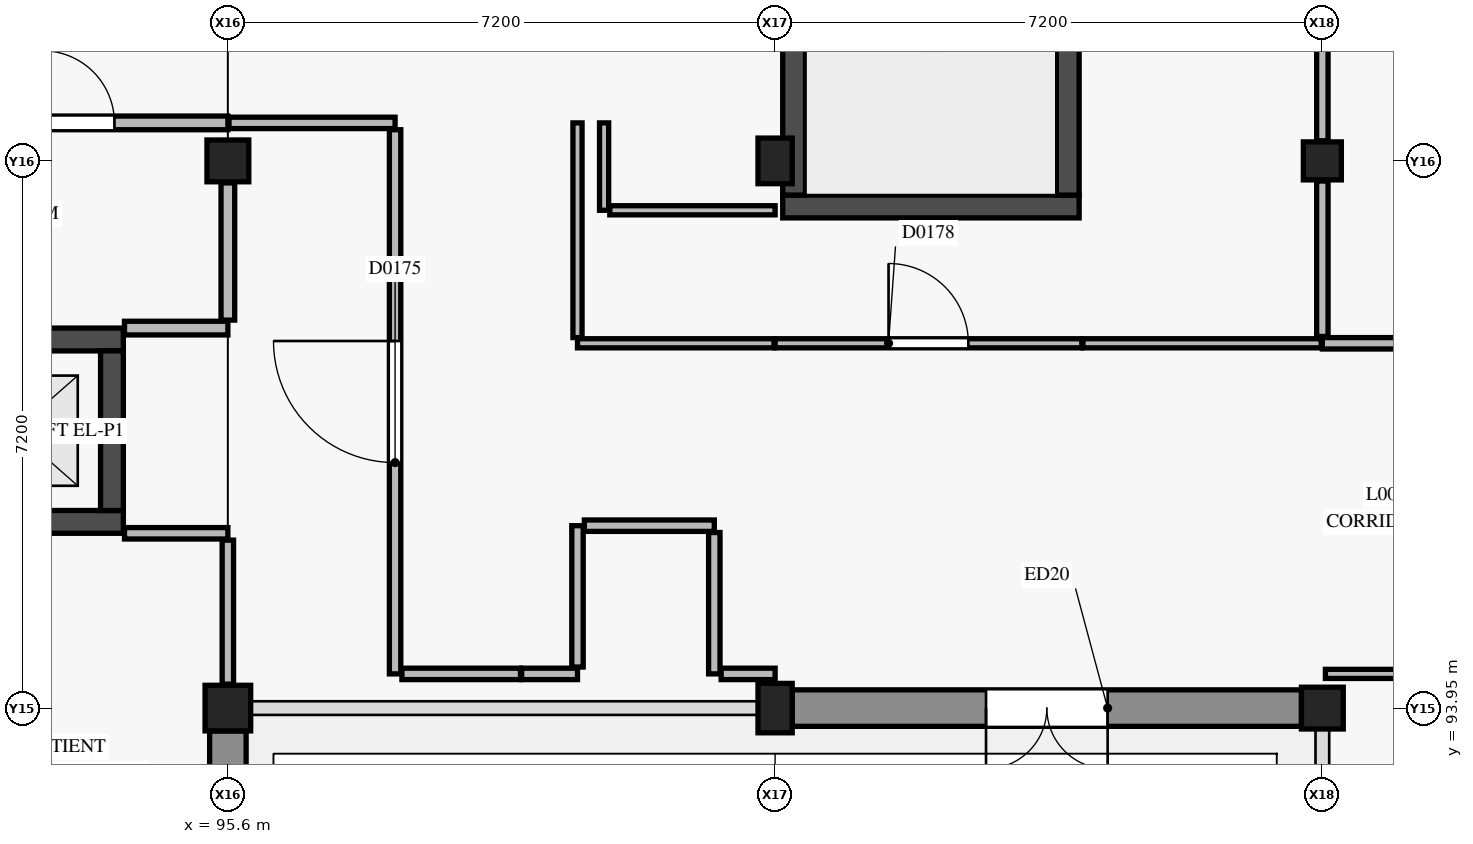
"""IFC4 building model, lengths in metres.
Left out: names, types, materials, properties, quantities, classifications, styles, units other than length and angle.
Written with IfcOpenShell. Run it as: python <this file> out.ifc"""

import sys

from ifc_helpers import new_model, si_unit, direction, frame, frame_2d, origin, origin_2d, place, context, subcontext, project, spatial, rectangle, extrude, element, fill, save


model = new_model("IFC4")
c1 = context("Model", 3, precision=1e-05, world=origin(), true_north=direction((0.0, 1.0)))
c2 = subcontext(c1, "Body", "Model", "MODEL_VIEW")
j1 = project(units=[si_unit("LENGTHUNIT", "METRE"), si_unit("PLANEANGLEUNIT", "RADIAN")], contexts=[c1])
p1 = place(None, origin())
s1 = spatial("IfcSite", under=j1, at=p1, CompositionType="ELEMENT")
p2 = place(p1, origin())
s2 = spatial("IfcBuilding", under=s1, at=p2, CompositionType="ELEMENT")
p3 = place(p2, origin())
s3 = spatial("IfcBuildingStorey", under=s2, at=p3, CompositionType="ELEMENT", Elevation=0.0)
p4 = place(p3, frame((95.6, 93.95, 0.0), z_axis=(0.0, 0.0, 1.0), x_axis=(1.0, 0.0, 0.0)))
e1 = element("IfcColumn", 1, at=p4, inside=s3, PredefinedType="COLUMN", context=c2, shape_type="SweptSolid", body=[
    extrude(rectangle(XDim=0.6, YDim=0.6, at=origin_2d()), origin(), (0.0, 0.0, 1.0), 4.8),
])
p5 = place(p3, frame((95.6, 101.15, 0.0), z_axis=(0.0, 0.0, 1.0), x_axis=(1.0, 0.0, 0.0)))
e2 = element("IfcColumn", 2, at=p5, inside=s3, PredefinedType="COLUMN", context=c2, shape_type="SweptSolid", body=[
    extrude(rectangle(XDim=0.55, YDim=0.55, at=origin_2d()), origin(), (0.0, 0.0, 1.0), 4.8),
])
p6 = place(p3, frame((102.8, 93.95, 0.0), z_axis=(0.0, 0.0, 1.0), x_axis=(1.0, 0.0, 0.0)))
e3 = element("IfcColumn", 3, at=p6, inside=s3, PredefinedType="COLUMN", context=c2, shape_type="SweptSolid", body=[
    extrude(rectangle(XDim=0.45, YDim=0.65, at=origin_2d()), origin(), (0.0, 0.0, 1.0), 4.8),
])
p7 = place(p3, frame((102.8, 101.15, 0.0), z_axis=(0.0, 0.0, 1.0), x_axis=(1.0, 0.0, 0.0)))
e4 = element("IfcColumn", 4, at=p7, inside=s3, PredefinedType="COLUMN", context=c2, shape_type="SweptSolid", body=[
    extrude(rectangle(XDim=0.45, YDim=0.6, at=origin_2d()), origin(), (0.0, 0.0, 1.0), 4.8),
])
p8 = place(p3, frame((110.0, 93.95, 0.0), z_axis=(0.0, 0.0, 1.0), x_axis=(1.0, 0.0, 0.0)))
e5 = element("IfcColumn", 5, at=p8, inside=s3, PredefinedType="COLUMN", context=c2, shape_type="SweptSolid", body=[
    extrude(rectangle(XDim=0.55, YDim=0.55, at=origin_2d()), origin(), (0.0, 0.0, 1.0), 4.8),
])
p9 = place(p3, frame((110.0, 101.15, 0.0), z_axis=(0.0, 0.0, 1.0), x_axis=(1.0, 0.0, 0.0)))
e6 = element("IfcColumn", 6, at=p9, inside=s3, PredefinedType="COLUMN", context=c2, shape_type="SweptSolid", body=[
    extrude(rectangle(XDim=0.5, YDim=0.5, at=origin_2d()), origin(), (0.0, 0.0, 1.0), 4.8),
])
p10 = place(p3, frame((102.9, 100.55, 0.0), z_axis=(0.0, 0.0, 1.0), x_axis=(1.0, 0.0, 0.0)))
e7 = element("IfcWall", 7, at=p10, inside=s3, PredefinedType="SHEAR", context=c2, shape_type="SweptSolid", body=[
    extrude(rectangle(XDim=3.9, YDim=0.3, at=frame_2d((1.95, 0.0))), origin(), (0.0, 0.0, 1.0), 4.55),
])
p11 = place(p3, frame((103.05, 100.7, 0.0), z_axis=(0.0, 0.0, 1.0), x_axis=(0.0, 1.0, 0.0)))
e8 = element("IfcWall", 8, at=p11, inside=s3, PredefinedType="SHEAR", context=c2, shape_type="SweptSolid", body=[
    extrude(rectangle(XDim=7.3, YDim=0.3, at=frame_2d((3.65, 0.0))), origin(), (0.0, 0.0, 1.0), 4.55),
])
p12 = place(p11, frame((5.68, 0.0, 0.0)))
e9 = element("IfcOpeningElement", 9, at=p12, cuts=e8, PredefinedType="OPENING", context=c2, shape_type="SweptSolid", body=[
    extrude(rectangle(XDim=1.5, YDim=2.15, at=frame_2d((0.75, 1.075))), frame((0.0, 0.16, 0.0), z_axis=(0.0, -1.0, 0.0), x_axis=(1.0, 0.0, 0.0)), (0.0, 0.0, 1.0), 0.32),
])
p13 = place(p3, frame((106.65, 100.7, 0.0), z_axis=(0.0, 0.0, 1.0), x_axis=(0.0, 1.0, 0.0)))
e10 = element("IfcWall", 10, at=p13, inside=s3, PredefinedType="SHEAR", context=c2, shape_type="SweptSolid", body=[
    extrude(rectangle(XDim=7.3, YDim=0.3, at=frame_2d((3.65, 0.0))), origin(), (0.0, 0.0, 1.0), 4.55),
])
for number, where, z_axis, x_axis in (
    (11, (91.375, 96.4, 0.0), (0.0, 0.0, 1.0), (1.0, 0.0, 0.0)),
    (12, (91.375, 98.8, 0.0), (0.0, 0.0, 1.0), (1.0, 0.0, 0.0)),
):
    element("IfcWall", number, at=place(p3, frame(where, z_axis=z_axis, x_axis=x_axis)), inside=s3, PredefinedType="SHEAR", context=c2, shape_type="SweptSolid", body=[
        extrude(rectangle(XDim=2.85, YDim=0.3, at=frame_2d((1.425, 0.0))), origin(), (0.0, 0.0, 1.0), 4.55),
    ])
p14 = place(p3, frame((94.075, 96.55, 0.0), z_axis=(0.0, 0.0, 1.0), x_axis=(0.0, 1.0, 0.0)))
e13 = element("IfcWall", 13, at=p14, inside=s3, PredefinedType="SHEAR", context=c2, shape_type="SweptSolid", body=[
    extrude(rectangle(XDim=2.1, YDim=0.3, at=frame_2d((1.05, 0.0))), origin(), (0.0, 0.0, 1.0), 4.55),
])
p15 = place(p3, frame((109.725, 93.95, 0.0), z_axis=(0.0, 0.0, 1.0), x_axis=(-1.0, 0.0, 0.0)))
e14 = element("IfcWall", 14, at=p15, inside=s3, PredefinedType="SOLIDWALL", context=c2, shape_type="SweptSolid", body=[
    extrude(rectangle(XDim=6.7, YDim=0.48, at=frame_2d((3.35, 0.0))), origin(), (0.0, 0.0, 1.0), 3.73),
])
p16 = place(p15, frame((2.55, 0.0, 0.0)))
e15 = element("IfcOpeningElement", 15, at=p16, cuts=e14, PredefinedType="OPENING", context=c2, shape_type="SweptSolid", body=[
    extrude(rectangle(XDim=1.6, YDim=2.3, at=frame_2d((0.8, 1.15))), frame((0.0, 0.25, 0.0), z_axis=(0.0, -1.0, 0.0), x_axis=(1.0, 0.0, 0.0)), (0.0, 0.0, 1.0), 0.5),
])
p17 = place(p3, frame((95.6, 93.65, 0.0), z_axis=(0.0, 0.0, 1.0), x_axis=(0.0, -1.0, 0.0)))
e16 = element("IfcWall", 16, at=p17, inside=s3, PredefinedType="SOLIDWALL", context=c2, shape_type="SweptSolid", body=[
    extrude(rectangle(XDim=6.575, YDim=0.48, at=frame_2d((3.288, 0.0))), origin(), (0.0, 0.0, 1.0), 3.73),
])
p18 = place(p17, frame((0.64, 0.0, 0.9)))
e17 = element("IfcOpeningElement", 17, at=p18, cuts=e16, PredefinedType="OPENING", context=c2, shape_type="SweptSolid", body=[
    extrude(rectangle(XDim=1.8, YDim=0.9, at=frame_2d((0.9, 0.45))), frame((0.0, 0.25, 0.0), z_axis=(0.0, -1.0, 0.0), x_axis=(1.0, 0.0, 0.0)), (0.0, 0.0, 1.0), 0.5),
])
p19 = place(p17, frame((4.448, 0.0, 0.6)))
e18 = element("IfcOpeningElement", 18, at=p19, cuts=e16, PredefinedType="OPENING", context=c2, shape_type="SweptSolid", body=[
    extrude(rectangle(XDim=0.8, YDim=2.6, at=frame_2d((0.4, 1.3))), frame((0.0, 0.25, 0.0), z_axis=(0.0, -1.0, 0.0), x_axis=(1.0, 0.0, 0.0)), (0.0, 0.0, 1.0), 0.5),
])
p20 = place(p3, frame((91.665, 101.65, 0.0), z_axis=(0.0, 0.0, 1.0), x_axis=(1.0, 0.0, 0.0)))
e19 = element("IfcWall", 19, at=p20, inside=s3, PredefinedType="PLUMBINGWALL", context=c2, shape_type="SweptSolid", body=[
    extrude(rectangle(XDim=3.935, YDim=0.18, at=frame_2d((1.968, 0.0))), origin(), (0.0, 0.0, 1.0), 3.885),
])
p21 = place(p20, frame((1.492, 0.0, 0.0)))
e20 = element("IfcOpeningElement", 20, at=p21, cuts=e19, PredefinedType="OPENING", context=c2, shape_type="SweptSolid", body=[
    extrude(rectangle(XDim=0.95, YDim=2.1, at=frame_2d((0.475, 1.05))), frame((0.0, 0.1, 0.0), z_axis=(0.0, -1.0, 0.0), x_axis=(1.0, 0.0, 0.0)), (0.0, 0.0, 1.0), 0.2),
])
p22 = place(p3, frame((95.615, 101.65, 0.0), z_axis=(0.0, 0.0, 1.0), x_axis=(1.0, 0.0, 0.0)))
e21 = element("IfcWall", 21, at=p22, inside=s3, PredefinedType="PARTITIONING", context=c2, shape_type="SweptSolid", body=[
    extrude(rectangle(XDim=2.185, YDim=0.15, at=frame_2d((1.093, 0.0))), origin(), (0.0, 0.0, 1.0), 3.885),
])
p23 = place(p3, frame((97.8, 94.4, 0.0), z_axis=(0.0, 0.0, 1.0), x_axis=(0.0, 1.0, 0.0)))
e22 = element("IfcWall", 22, at=p23, inside=s3, PredefinedType="PARTITIONING", context=c2, shape_type="SweptSolid", body=[
    extrude(rectangle(XDim=7.16, YDim=0.15, at=frame_2d((3.58, 0.0))), origin(), (0.0, 0.0, 1.0), 3.955),
])
p24 = place(p23, frame((2.78, 0.0, 0.0)))
e23 = element("IfcOpeningElement", 23, at=p24, cuts=e22, PredefinedType="OPENING", context=c2, shape_type="SweptSolid", body=[
    extrude(rectangle(XDim=1.6, YDim=2.25, at=frame_2d((0.8, 1.125))), frame((0.0, 0.085, 0.0), z_axis=(0.0, -1.0, 0.0), x_axis=(1.0, 0.0, 0.0)), (0.0, 0.0, 1.0), 0.17),
])
p25 = place(p3, frame((97.89, 94.4, 0.0), z_axis=(0.0, 0.0, 1.0), x_axis=(1.0, 0.0, 0.0)))
e24 = element("IfcWall", 24, at=p25, inside=s3, PredefinedType="PARTITIONING", context=c2, shape_type="SweptSolid", body=[
    extrude(rectangle(XDim=1.56, YDim=0.15, at=frame_2d((0.78, 0.0))), origin(), (0.0, 0.0, 1.0), 4.55),
])
p26 = place(p3, frame((99.465, 94.4, 0.0), z_axis=(0.0, 0.0, 1.0), x_axis=(1.0, 0.0, 0.0)))
e25 = element("IfcWall", 25, at=p26, inside=s3, PredefinedType="PARTITIONING", context=c2, shape_type="SweptSolid", body=[
    extrude(rectangle(XDim=0.735, YDim=0.15, at=frame_2d((0.367, 0.0))), origin(), (0.0, 0.0, 1.0), 4.55),
])
p27 = place(p3, frame((100.2, 94.49, 0.0), z_axis=(0.0, 0.0, 1.0), x_axis=(0.0, 1.0, 0.0)))
e26 = element("IfcWall", 26, at=p27, inside=s3, PredefinedType="PARTITIONING", context=c2, shape_type="SweptSolid", body=[
    extrude(rectangle(XDim=1.86, YDim=0.15, at=frame_2d((0.93, 0.0))), origin(), (0.0, 0.0, 1.0), 4.075),
])
p28 = place(p3, frame((100.29, 96.35, 0.0), z_axis=(0.0, 0.0, 1.0), x_axis=(1.0, 0.0, 0.0)))
e27 = element("IfcWall", 27, at=p28, inside=s3, PredefinedType="PARTITIONING", context=c2, shape_type="SweptSolid", body=[
    extrude(rectangle(XDim=1.71, YDim=0.15, at=frame_2d((0.855, 0.0))), origin(), (0.0, 0.0, 1.0), 4.075),
])
p29 = place(p3, frame((102.0, 94.4, 0.0), z_axis=(0.0, 0.0, 1.0), x_axis=(0.0, 1.0, 0.0)))
e28 = element("IfcWall", 28, at=p29, inside=s3, PredefinedType="PARTITIONING", context=c2, shape_type="SweptSolid", body=[
    extrude(rectangle(XDim=1.86, YDim=0.15, at=frame_2d((0.93, 0.0))), origin(), (0.0, 0.0, 1.0), 4.55),
])
p30 = place(p3, frame((102.09, 94.4, 0.0), z_axis=(0.0, 0.0, 1.0), x_axis=(1.0, 0.0, 0.0)))
e29 = element("IfcWall", 29, at=p30, inside=s3, PredefinedType="PARTITIONING", context=c2, shape_type="SweptSolid", body=[
    extrude(rectangle(XDim=0.71, YDim=0.15, at=frame_2d((0.355, 0.0))), origin(), (0.0, 0.0, 1.0), 4.015),
])
p31 = place(p3, frame((110.0, 98.75, 0.0), z_axis=(0.0, 0.0, 1.0), x_axis=(1.0, 0.0, 0.0)))
e30 = element("IfcWall", 30, at=p31, inside=s3, PredefinedType="PARTITIONING", context=c2, shape_type="SweptSolid", body=[
    extrude(rectangle(XDim=2.31, YDim=0.15, at=frame_2d((1.155, 0.0))), origin(), (0.0, 0.0, 1.0), 3.885),
])
p32 = place(p3, frame((110.04, 94.4, 0.0), z_axis=(0.0, 0.0, 1.0), x_axis=(1.0, 0.0, 0.0)))
e31 = element("IfcWall", 31, at=p32, inside=s3, PredefinedType="PARTITIONING", context=c2, shape_type="SweptSolid", body=[
    extrude(rectangle(XDim=2.285, YDim=0.12, at=frame_2d((1.143, 0.0))), origin(), (0.0, 0.0, 1.0), 3.885),
])
p33 = place(p3, frame((100.55, 100.5, 0.0), z_axis=(0.0, 0.0, 1.0), x_axis=(0.0, 1.0, 0.0)))
e32 = element("IfcWall", 32, at=p33, inside=s3, PredefinedType="PARTITIONING", context=c2, shape_type="SweptSolid", body=[
    extrude(rectangle(XDim=1.15, YDim=0.12, at=frame_2d((0.575, 0.0))), origin(), (0.0, 0.0, 1.0), 3.955),
])
p34 = place(p3, frame((100.625, 100.5, 0.0), z_axis=(0.0, 0.0, 1.0), x_axis=(1.0, 0.0, 0.0)))
e33 = element("IfcWall", 33, at=p34, inside=s3, PredefinedType="PARTITIONING", context=c2, shape_type="SweptSolid", body=[
    extrude(rectangle(XDim=2.175, YDim=0.12, at=frame_2d((1.087, 0.0))), origin(), (0.0, 0.0, 1.0), 4.015),
])
p35 = place(p3, frame((106.85, 98.75, 0.0), z_axis=(0.0, 0.0, 1.0), x_axis=(1.0, 0.0, 0.0)))
e34 = element("IfcWall", 34, at=p35, inside=s3, PredefinedType="PARTITIONING", context=c2, shape_type="SweptSolid", body=[
    extrude(rectangle(XDim=3.135, YDim=0.12, at=frame_2d((1.567, 0.0))), origin(), (0.0, 0.0, 1.0), 3.885),
])
p36 = place(p3, frame((102.8, 98.75, 0.0), z_axis=(0.0, 0.0, 1.0), x_axis=(1.0, 0.0, 0.0)))
e35 = element("IfcWall", 35, at=p36, inside=s3, PredefinedType="PARTITIONING", context=c2, shape_type="SweptSolid", body=[
    extrude(rectangle(XDim=4.035, YDim=0.12, at=frame_2d((2.018, 0.0))), origin(), (0.0, 0.0, 1.0), 4.015),
])
p37 = place(p36, frame((1.492, 0.0, 0.0)))
e36 = element("IfcOpeningElement", 36, at=p37, cuts=e35, PredefinedType="OPENING", context=c2, shape_type="SweptSolid", body=[
    extrude(rectangle(XDim=1.05, YDim=2.15, at=frame_2d((0.525, 1.075))), frame((0.0, 0.07, 0.0), z_axis=(0.0, -1.0, 0.0), x_axis=(1.0, 0.0, 0.0)), (0.0, 0.0, 1.0), 0.14),
])
p38 = place(p3, frame((100.2, 98.75, 0.0), z_axis=(0.0, 0.0, 1.0), x_axis=(1.0, 0.0, 0.0)))
e37 = element("IfcWall", 37, at=p38, inside=s3, PredefinedType="PARTITIONING", context=c2, shape_type="SweptSolid", body=[
    extrude(rectangle(XDim=2.585, YDim=0.12, at=frame_2d((1.292, 0.0))), origin(), (0.0, 0.0, 1.0), 4.015),
])
p39 = place(p3, frame((100.2, 98.825, 0.0), z_axis=(0.0, 0.0, 1.0), x_axis=(0.0, 1.0, 0.0)))
e38 = element("IfcWall", 38, at=p39, inside=s3, PredefinedType="PARTITIONING", context=c2, shape_type="SweptSolid", body=[
    extrude(rectangle(XDim=2.825, YDim=0.12, at=frame_2d((1.413, 0.0))), origin(), (0.0, 0.0, 1.0), 3.955),
])
p40 = place(p3, frame((94.24, 98.95, 0.0), z_axis=(0.0, 0.0, 1.0), x_axis=(1.0, 0.0, 0.0)))
e39 = element("IfcWall", 39, at=p40, inside=s3, PredefinedType="PLUMBINGWALL", context=c2, shape_type="SweptSolid", body=[
    extrude(rectangle(XDim=1.36, YDim=0.18, at=frame_2d((0.68, 0.0))), origin(), (0.0, 0.0, 1.0), 3.885),
])
p41 = place(p3, frame((95.6, 99.055, 0.0), z_axis=(0.0, 0.0, 1.0), x_axis=(0.0, 1.0, 0.0)))
e40 = element("IfcWall", 40, at=p41, inside=s3, PredefinedType="PLUMBINGWALL", context=c2, shape_type="SweptSolid", body=[
    extrude(rectangle(XDim=1.805, YDim=0.18, at=frame_2d((0.903, 0.0))), origin(), (0.0, 0.0, 1.0), 3.885),
])
p42 = place(p3, frame((94.24, 96.25, 0.0), z_axis=(0.0, 0.0, 1.0), x_axis=(1.0, 0.0, 0.0)))
e41 = element("IfcWall", 41, at=p42, inside=s3, PredefinedType="PARTITIONING", context=c2, shape_type="SweptSolid", body=[
    extrude(rectangle(XDim=1.36, YDim=0.15, at=frame_2d((0.68, 0.0))), origin(), (0.0, 0.0, 1.0), 3.885),
])
p43 = place(p3, frame((95.6, 94.265, 0.0), z_axis=(0.0, 0.0, 1.0), x_axis=(0.0, 1.0, 0.0)))
e42 = element("IfcWall", 42, at=p43, inside=s3, PredefinedType="PARTITIONING", context=c2, shape_type="SweptSolid", body=[
    extrude(rectangle(XDim=1.895, YDim=0.15, at=frame_2d((0.948, 0.0))), origin(), (0.0, 0.0, 1.0), 3.885),
])
p44 = place(p3, frame((110.0, 98.84, 0.0), z_axis=(0.0, 0.0, 1.0), x_axis=(0.0, 1.0, 0.0)))
e43 = element("IfcWall", 43, at=p44, inside=s3, PredefinedType="PARTITIONING", context=c2, shape_type="SweptSolid", body=[
    extrude(rectangle(XDim=2.045, YDim=0.15, at=frame_2d((1.022, 0.0))), origin(), (0.0, 0.0, 1.0), 3.885),
])
p45 = place(p3, frame((110.0, 101.415, 0.0), z_axis=(0.0, 0.0, 1.0), x_axis=(0.0, 1.0, 0.0)))
e44 = element("IfcWall", 44, at=p45, inside=s3, PredefinedType="PARTITIONING", context=c2, shape_type="SweptSolid", body=[
    extrude(rectangle(XDim=6.695, YDim=0.15, at=frame_2d((3.348, 0.0))), origin(), (0.0, 0.0, 1.0), 3.885),
])
p46 = place(p16, origin())
e45 = element("IfcDoor", 45, at=p46, inside=s3, OperationType="DOUBLE_DOOR_SINGLE_SWING", PredefinedType="DOOR", context=c2, shape_type="SweptSolid", body=[
    extrude(rectangle(XDim=1.6, YDim=2.3, at=frame_2d((0.8, 1.15))), frame((0.0, 0.025, 0.0), z_axis=(0.0, -1.0, 0.0), x_axis=(1.0, 0.0, 0.0)), (0.0, 0.0, 1.0), 0.05),
])
fill(e15, e45)
p47 = place(p24, origin())
e46 = element("IfcDoor", 46, at=p47, inside=s3, OperationType="SINGLE_SWING_RIGHT", PredefinedType="DOOR", context=c2, shape_type="SweptSolid", body=[
    extrude(rectangle(XDim=1.6, YDim=2.25, at=frame_2d((0.8, 1.125))), frame((0.0, 0.025, 0.0), z_axis=(0.0, -1.0, 0.0), x_axis=(1.0, 0.0, 0.0)), (0.0, 0.0, 1.0), 0.05),
])
fill(e23, e46)
p48 = place(p37, origin())
e47 = element("IfcDoor", 47, at=p48, inside=s3, OperationType="SINGLE_SWING_LEFT", PredefinedType="DOOR", context=c2, shape_type="SweptSolid", body=[
    extrude(rectangle(XDim=1.05, YDim=2.15, at=frame_2d((0.525, 1.075))), frame((0.0, 0.025, 0.0), z_axis=(0.0, -1.0, 0.0), x_axis=(1.0, 0.0, 0.0)), (0.0, 0.0, 1.0), 0.05),
])
fill(e36, e47)
p49 = place(p21, origin())
e48 = element("IfcDoor", 48, at=p49, inside=s3, OperationType="SINGLE_SWING_LEFT", PredefinedType="DOOR", context=c2, shape_type="SweptSolid", body=[
    extrude(rectangle(XDim=0.95, YDim=2.1, at=frame_2d((0.475, 1.05))), frame((0.0, 0.025, 0.0), z_axis=(0.0, -1.0, 0.0), x_axis=(1.0, 0.0, 0.0)), (0.0, 0.0, 1.0), 0.05),
])
fill(e20, e48)
save(model, sys.argv[1])
